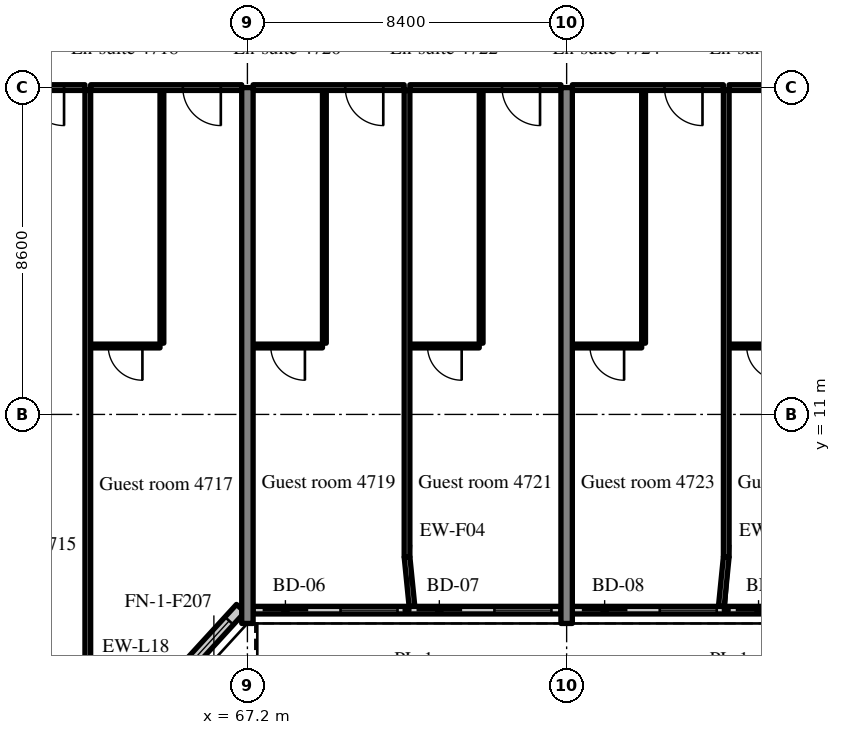
"""IFC4 building model, lengths in metres.
Left out: names, types, materials, properties, quantities, classifications, styles, units other than length and angle.
Written with IfcOpenShell. Run it as: python <this file> out.ifc"""

import sys

from ifc_helpers import new_model, si_unit, direction, frame, frame_2d, origin, place, context, subcontext, project, spatial, rectangle, extrude, source, transform, mapped, element, fill, save


model = new_model("IFC4")
c1 = context("Model", 3, precision=1e-05, world=origin(), true_north=direction((0.0, 1.0)))
c2 = subcontext(c1, "Body", "Model", "MODEL_VIEW")
j1 = project(units=[si_unit("LENGTHUNIT", "METRE"), si_unit("PLANEANGLEUNIT", "RADIAN")], contexts=[c1])
p1 = place(None, origin())
s1 = spatial("IfcSite", under=j1, at=p1, CompositionType="ELEMENT")
p2 = place(p1, origin())
s2 = spatial("IfcBuilding", under=s1, at=p2, CompositionType="ELEMENT")
p3 = place(p2, frame((0.0, 0.0, 193.4)))
s3 = spatial("IfcBuildingStorey", under=s2, at=p3, CompositionType="ELEMENT", Elevation=193.4)
m1 = source(origin(), c2, "Body", "SweptSolid", [
    extrude(rectangle(XDim=14.1, YDim=0.3, at=frame_2d((7.05, 0.0))), origin(), (0.0, 0.0, 1.0), 3.52),
])
for number, where, z_axis, x_axis in (
    (1, (67.2, 5.5, 0.0), (0.0, 0.0, 1.0), (0.0, 1.0, 0.0)),
    (2, (75.6, 5.5, 0.0), (0.0, 0.0, 1.0), (0.0, 1.0, 0.0)),
):
    element("IfcWall", number, at=place(p3, frame(where, z_axis=z_axis, x_axis=x_axis)), inside=s3, PredefinedType="SHEAR", context=c2, shape_type="MappedRepresentation", body=[
        mapped(m1, transform((0.0, 0.0, 0.0), scale=1.0)),
    ])
m2 = source(origin(), c2, "Body", "SweptSolid", [
    extrude(rectangle(XDim=2.398, YDim=0.3, at=frame_2d((1.199, 0.0))), origin(), (0.0, 0.0, 1.0), 3.52),
])
p4 = place(p3, frame((65.404, 4.131, 0.0), z_axis=(0.0, 0.0, 1.0), x_axis=(0.675374189419, 0.737475222815, 0.0)))
e3 = element("IfcWall", 3, at=p4, inside=s3, PredefinedType="SOLIDWALL", context=c2, shape_type="MappedRepresentation", body=[
    mapped(m2, transform((0.0, 0.0, 0.0), scale=1.0)),
])
m3 = source(origin(), c2, "Body", "SweptSolid", [
    extrude(rectangle(XDim=1.5, YDim=2.0, at=frame_2d((0.75, 1.0))), frame((0.0, 0.16, 0.0), z_axis=(0.0, -1.0, 0.0), x_axis=(1.0, 0.0, 0.0)), (0.0, 0.0, 1.0), 0.32),
])
p5 = place(p4, frame((0.449, 0.0, 0.9)))
e4 = element("IfcOpeningElement", 4, at=p5, cuts=e3, PredefinedType="OPENING", context=c2, shape_type="MappedRepresentation", body=[
    mapped(m3, transform((0.0, 0.0, 0.0), scale=1.0)),
])
m4 = source(origin(), c2, "Body", "SweptSolid", [
    extrude(rectangle(XDim=8.1, YDim=0.2, at=frame_2d((4.05, 0.0))), origin(), (0.0, 0.0, 1.0), 2.87),
])
p6 = place(p3, frame((67.35, 5.85, 0.0), z_axis=(0.0, 0.0, 1.0), x_axis=(1.0, 0.0, 0.0)))
e5 = element("IfcWall", 5, at=p6, inside=s3, PredefinedType="SOLIDWALL", context=c2, shape_type="MappedRepresentation", body=[
    mapped(m4, transform((0.0, 0.0, 0.0), scale=1.0)),
])
m5 = source(origin(), c2, "Body", "SweptSolid", [
    extrude(rectangle(XDim=1.2, YDim=2.4, at=frame_2d((0.6, 1.2))), frame((0.0, 0.11, 0.0), z_axis=(0.0, -1.0, 0.0), x_axis=(1.0, 0.0, 0.0)), (0.0, 0.0, 1.0), 0.22),
])
p7 = place(p6, frame((0.25, 0.0, 0.0)))
e6 = element("IfcOpeningElement", 6, at=p7, cuts=e5, PredefinedType="OPENING", context=c2, shape_type="MappedRepresentation", body=[
    mapped(m5, transform((0.0, 0.0, 0.0), scale=1.0)),
])
m6 = source(origin(), c2, "Body", "SweptSolid", [
    extrude(rectangle(XDim=1.5, YDim=1.5, at=frame_2d((0.75, 0.75))), frame((0.0, 0.11, 0.0), z_axis=(0.0, -1.0, 0.0), x_axis=(1.0, 0.0, 0.0)), (0.0, 0.0, 1.0), 0.22),
])
p8 = place(p6, frame((2.3, 0.0, 0.9)))
e7 = element("IfcOpeningElement", 7, at=p8, cuts=e5, PredefinedType="OPENING", context=c2, shape_type="MappedRepresentation", body=[
    mapped(m6, transform((0.0, 0.0, 0.0), scale=1.0)),
])
p9 = place(p6, frame((4.3, 0.0, 0.0)))
e8 = element("IfcOpeningElement", 8, at=p9, cuts=e5, PredefinedType="OPENING", context=c2, shape_type="MappedRepresentation", body=[
    mapped(m5, transform((0.0, 0.0, 0.0), scale=1.0)),
])
p10 = place(p6, frame((6.35, 0.0, 0.9)))
e9 = element("IfcOpeningElement", 9, at=p10, cuts=e5, PredefinedType="OPENING", context=c2, shape_type="MappedRepresentation", body=[
    mapped(m6, transform((0.0, 0.0, 0.0), scale=1.0)),
])
m7 = source(origin(), c2, "Body", "SweptSolid", [
    extrude(rectangle(XDim=8.1, YDim=0.2, at=frame_2d((4.05, 0.0))), origin(), (0.0, 0.0, 1.0), 2.87),
])
p11 = place(p3, frame((75.75, 5.85, 0.0), z_axis=(0.0, 0.0, 1.0), x_axis=(1.0, 0.0, 0.0)))
e10 = element("IfcWall", 10, at=p11, inside=s3, PredefinedType="SOLIDWALL", context=c2, shape_type="MappedRepresentation", body=[
    mapped(m7, transform((0.0, 0.0, 0.0), scale=1.0)),
])
p12 = place(p11, frame((0.25, 0.0, 0.0)))
e11 = element("IfcOpeningElement", 11, at=p12, cuts=e10, PredefinedType="OPENING", context=c2, shape_type="MappedRepresentation", body=[
    mapped(m5, transform((0.0, 0.0, 0.0), scale=1.0)),
])
p13 = place(p11, frame((2.3, 0.0, 0.9)))
e12 = element("IfcOpeningElement", 12, at=p13, cuts=e10, PredefinedType="OPENING", context=c2, shape_type="MappedRepresentation", body=[
    mapped(m6, transform((0.0, 0.0, 0.0), scale=1.0)),
])
p14 = place(p11, frame((4.3, 0.0, 0.0)))
e13 = element("IfcOpeningElement", 13, at=p14, cuts=e10, PredefinedType="OPENING", context=c2, shape_type="MappedRepresentation", body=[
    mapped(m5, transform((0.0, 0.0, 0.0), scale=1.0)),
])
p15 = place(p11, frame((6.35, 0.0, 0.9)))
e14 = element("IfcOpeningElement", 14, at=p15, cuts=e10, PredefinedType="OPENING", context=c2, shape_type="MappedRepresentation", body=[
    mapped(m6, transform((0.0, 0.0, 0.0), scale=1.0)),
])
m8 = source(origin(), c2, "Body", "SweptSolid", [
    extrude(rectangle(XDim=3.975, YDim=0.15, at=frame_2d((1.988, 0.0))), origin(), (0.0, 0.0, 1.0), 2.82),
])
p16 = place(p3, frame((58.95, 19.6, 0.0), z_axis=(0.0, 0.0, 1.0), x_axis=(1.0, 0.0, 0.0)))
e15 = element("IfcWall", 15, at=p16, inside=s3, PredefinedType="PARTITIONING", context=c2, shape_type="MappedRepresentation", body=[
    mapped(m8, transform((0.0, 0.0, 0.0), scale=1.0)),
])
m9 = source(origin(), c2, "Body", "SweptSolid", [
    extrude(rectangle(XDim=1.0, YDim=2.1, at=frame_2d((0.5, 1.05))), frame((0.0, 0.085, 0.0), z_axis=(0.0, -1.0, 0.0), x_axis=(1.0, 0.0, 0.0)), (0.0, 0.0, 1.0), 0.17),
])
p17 = place(p16, frame((2.425, 0.0, 0.0)))
e16 = element("IfcOpeningElement", 16, at=p17, cuts=e15, PredefinedType="OPENING", context=c2, shape_type="MappedRepresentation", body=[
    mapped(m9, transform((0.0, 0.0, 0.0), scale=1.0)),
])
m10 = source(origin(), c2, "Body", "SweptSolid", [
    extrude(rectangle(XDim=6.65, YDim=0.1, at=frame_2d((3.325, 0.0))), origin(), (0.0, 0.0, 1.0), 3.52),
])
p18 = place(p3, frame((64.95, 12.875, 0.0), z_axis=(0.0, 0.0, 1.0), x_axis=(0.0, 1.0, 0.0)))
e17 = element("IfcWall", 17, at=p18, inside=s3, PredefinedType="PARTITIONING", context=c2, shape_type="MappedRepresentation", body=[
    mapped(m10, transform((0.0, 0.0, 0.0), scale=1.0)),
])
m11 = source(origin(), c2, "Body", "SweptSolid", [
    extrude(rectangle(XDim=1.825, YDim=0.1, at=frame_2d((0.913, 0.0))), origin(), (0.0, 0.0, 1.0), 3.52),
])
p19 = place(p3, frame((63.075, 12.8, 0.0), z_axis=(0.0, 0.0, 1.0), x_axis=(1.0, 0.0, 0.0)))
e18 = element("IfcWall", 18, at=p19, inside=s3, PredefinedType="PARTITIONING", context=c2, shape_type="MappedRepresentation", body=[
    mapped(m11, transform((0.0, 0.0, 0.0), scale=1.0)),
])
m12 = source(origin(), c2, "Body", "SweptSolid", [
    extrude(rectangle(XDim=0.9, YDim=2.1, at=frame_2d((0.45, 1.05))), frame((0.0, 0.06, 0.0), z_axis=(0.0, -1.0, 0.0), x_axis=(1.0, 0.0, 0.0)), (0.0, 0.0, 1.0), 0.12),
])
p20 = place(p19, frame((0.462, 0.0, 0.0)))
e19 = element("IfcOpeningElement", 19, at=p20, cuts=e18, PredefinedType="OPENING", context=c2, shape_type="MappedRepresentation", body=[
    mapped(m12, transform((0.0, 0.0, 0.0), scale=1.0)),
])
p21 = place(p3, frame((63.075, 19.6, 0.0), z_axis=(0.0, 0.0, 1.0), x_axis=(1.0, 0.0, 0.0)))
e20 = element("IfcWall", 20, at=p21, inside=s3, PredefinedType="PARTITIONING", context=c2, shape_type="MappedRepresentation", body=[
    mapped(m8, transform((0.0, 0.0, 0.0), scale=1.0)),
])
p22 = place(p21, frame((2.425, 0.0, 0.0)))
e21 = element("IfcOpeningElement", 21, at=p22, cuts=e20, PredefinedType="OPENING", context=c2, shape_type="MappedRepresentation", body=[
    mapped(m9, transform((0.0, 0.0, 0.0), scale=1.0)),
])
m13 = source(origin(), c2, "Body", "SweptSolid", [
    extrude(rectangle(XDim=15.498, YDim=0.15, at=frame_2d((7.749, 0.0))), origin(), (0.0, 0.0, 1.0), 3.52),
])
p23 = place(p3, frame((63.0, 4.027, 0.0), z_axis=(0.0, 0.0, 1.0), x_axis=(0.0, 1.0, 0.0)))
e22 = element("IfcWall", 22, at=p23, inside=s3, PredefinedType="PARTITIONING", context=c2, shape_type="MappedRepresentation", body=[
    mapped(m13, transform((0.0, 0.0, 0.0), scale=1.0)),
])
p24 = place(p3, frame((69.225, 12.875, 0.0), z_axis=(0.0, 0.0, 1.0), x_axis=(0.0, 1.0, 0.0)))
e23 = element("IfcWall", 23, at=p24, inside=s3, PredefinedType="PARTITIONING", context=c2, shape_type="MappedRepresentation", body=[
    mapped(m10, transform((0.0, 0.0, 0.0), scale=1.0)),
])
p25 = place(p3, frame((67.35, 12.8, 0.0), z_axis=(0.0, 0.0, 1.0), x_axis=(1.0, 0.0, 0.0)))
e24 = element("IfcWall", 24, at=p25, inside=s3, PredefinedType="PARTITIONING", context=c2, shape_type="MappedRepresentation", body=[
    mapped(m11, transform((0.0, 0.0, 0.0), scale=1.0)),
])
p26 = place(p25, frame((0.463, 0.0, 0.0)))
e25 = element("IfcOpeningElement", 25, at=p26, cuts=e24, PredefinedType="OPENING", context=c2, shape_type="MappedRepresentation", body=[
    mapped(m12, transform((0.0, 0.0, 0.0), scale=1.0)),
])
m14 = source(origin(), c2, "Body", "SweptSolid", [
    extrude(rectangle(XDim=3.975, YDim=0.15, at=frame_2d((1.987, 0.0))), origin(), (0.0, 0.0, 1.0), 2.82),
])
p27 = place(p3, frame((67.35, 19.6, 0.0), z_axis=(0.0, 0.0, 1.0), x_axis=(1.0, 0.0, 0.0)))
e26 = element("IfcWall", 26, at=p27, inside=s3, PredefinedType="PARTITIONING", context=c2, shape_type="MappedRepresentation", body=[
    mapped(m14, transform((0.0, 0.0, 0.0), scale=1.0)),
])
p28 = place(p27, frame((2.425, 0.0, 0.0)))
e27 = element("IfcOpeningElement", 27, at=p28, cuts=e26, PredefinedType="OPENING", context=c2, shape_type="MappedRepresentation", body=[
    mapped(m9, transform((0.0, 0.0, 0.0), scale=1.0)),
])
p29 = place(p3, frame((73.35, 12.875, 0.0), z_axis=(0.0, 0.0, 1.0), x_axis=(0.0, 1.0, 0.0)))
e28 = element("IfcWall", 28, at=p29, inside=s3, PredefinedType="PARTITIONING", context=c2, shape_type="MappedRepresentation", body=[
    mapped(m10, transform((0.0, 0.0, 0.0), scale=1.0)),
])
p30 = place(p3, frame((71.475, 12.8, 0.0), z_axis=(0.0, 0.0, 1.0), x_axis=(1.0, 0.0, 0.0)))
e29 = element("IfcWall", 29, at=p30, inside=s3, PredefinedType="PARTITIONING", context=c2, shape_type="MappedRepresentation", body=[
    mapped(m11, transform((0.0, 0.0, 0.0), scale=1.0)),
])
p31 = place(p30, frame((0.463, 0.0, 0.0)))
e30 = element("IfcOpeningElement", 30, at=p31, cuts=e29, PredefinedType="OPENING", context=c2, shape_type="MappedRepresentation", body=[
    mapped(m12, transform((0.0, 0.0, 0.0), scale=1.0)),
])
p32 = place(p3, frame((71.475, 19.6, 0.0), z_axis=(0.0, 0.0, 1.0), x_axis=(1.0, 0.0, 0.0)))
e31 = element("IfcWall", 31, at=p32, inside=s3, PredefinedType="PARTITIONING", context=c2, shape_type="MappedRepresentation", body=[
    mapped(m14, transform((0.0, 0.0, 0.0), scale=1.0)),
])
p33 = place(p32, frame((2.425, 0.0, 0.0)))
e32 = element("IfcOpeningElement", 32, at=p33, cuts=e31, PredefinedType="OPENING", context=c2, shape_type="MappedRepresentation", body=[
    mapped(m9, transform((0.0, 0.0, 0.0), scale=1.0)),
])
m15 = source(origin(), c2, "Body", "SweptSolid", [
    extrude(rectangle(XDim=12.275, YDim=0.15, at=frame_2d((6.137, 0.0))), origin(), (0.0, 0.0, 1.0), 3.52),
])
p34 = place(p3, frame((71.4, 7.25, 0.0), z_axis=(0.0, 0.0, 1.0), x_axis=(0.0, 1.0, 0.0)))
e33 = element("IfcWall", 33, at=p34, inside=s3, PredefinedType="PARTITIONING", context=c2, shape_type="MappedRepresentation", body=[
    mapped(m15, transform((0.0, 0.0, 0.0), scale=1.0)),
])
p35 = place(p3, frame((77.625, 12.875, 0.0), z_axis=(0.0, 0.0, 1.0), x_axis=(0.0, 1.0, 0.0)))
e34 = element("IfcWall", 34, at=p35, inside=s3, PredefinedType="PARTITIONING", context=c2, shape_type="MappedRepresentation", body=[
    mapped(m10, transform((0.0, 0.0, 0.0), scale=1.0)),
])
p36 = place(p3, frame((75.75, 12.8, 0.0), z_axis=(0.0, 0.0, 1.0), x_axis=(1.0, 0.0, 0.0)))
e35 = element("IfcWall", 35, at=p36, inside=s3, PredefinedType="PARTITIONING", context=c2, shape_type="MappedRepresentation", body=[
    mapped(m11, transform((0.0, 0.0, 0.0), scale=1.0)),
])
p37 = place(p36, frame((0.462, 0.0, 0.0)))
e36 = element("IfcOpeningElement", 36, at=p37, cuts=e35, PredefinedType="OPENING", context=c2, shape_type="MappedRepresentation", body=[
    mapped(m12, transform((0.0, 0.0, 0.0), scale=1.0)),
])
p38 = place(p3, frame((75.75, 19.6, 0.0), z_axis=(0.0, 0.0, 1.0), x_axis=(1.0, 0.0, 0.0)))
e37 = element("IfcWall", 37, at=p38, inside=s3, PredefinedType="PARTITIONING", context=c2, shape_type="MappedRepresentation", body=[
    mapped(m8, transform((0.0, 0.0, 0.0), scale=1.0)),
])
p39 = place(p38, frame((2.425, 0.0, 0.0)))
e38 = element("IfcOpeningElement", 38, at=p39, cuts=e37, PredefinedType="OPENING", context=c2, shape_type="MappedRepresentation", body=[
    mapped(m9, transform((0.0, 0.0, 0.0), scale=1.0)),
])
p40 = place(p3, frame((79.875, 12.8, 0.0), z_axis=(0.0, 0.0, 1.0), x_axis=(1.0, 0.0, 0.0)))
e39 = element("IfcWall", 39, at=p40, inside=s3, PredefinedType="PARTITIONING", context=c2, shape_type="MappedRepresentation", body=[
    mapped(m11, transform((0.0, 0.0, 0.0), scale=1.0)),
])
p41 = place(p40, frame((0.462, 0.0, 0.0)))
e40 = element("IfcOpeningElement", 40, at=p41, cuts=e39, PredefinedType="OPENING", context=c2, shape_type="MappedRepresentation", body=[
    mapped(m12, transform((0.0, 0.0, 0.0), scale=1.0)),
])
p42 = place(p3, frame((79.875, 19.6, 0.0), z_axis=(0.0, 0.0, 1.0), x_axis=(1.0, 0.0, 0.0)))
e41 = element("IfcWall", 41, at=p42, inside=s3, PredefinedType="PARTITIONING", context=c2, shape_type="MappedRepresentation", body=[
    mapped(m8, transform((0.0, 0.0, 0.0), scale=1.0)),
])
p43 = place(p42, frame((2.425, 0.0, 0.0)))
e42 = element("IfcOpeningElement", 42, at=p43, cuts=e41, PredefinedType="OPENING", context=c2, shape_type="MappedRepresentation", body=[
    mapped(m9, transform((0.0, 0.0, 0.0), scale=1.0)),
])
p44 = place(p3, frame((79.8, 7.25, 0.0), z_axis=(0.0, 0.0, 1.0), x_axis=(0.0, 1.0, 0.0)))
e43 = element("IfcWall", 43, at=p44, inside=s3, PredefinedType="PARTITIONING", context=c2, shape_type="MappedRepresentation", body=[
    mapped(m15, transform((0.0, 0.0, 0.0), scale=1.0)),
])
m16 = source(origin(), c2, "Body", "SweptSolid", [
    extrude(rectangle(XDim=1.307, YDim=0.15, at=frame_2d((0.653, 0.0))), origin(), (0.0, 0.0, 1.0), 3.52),
])
for number, where, z_axis, x_axis in (
    (44, (71.53, 5.95, 0.0), (0.0, 0.0, 1.0), (-0.1, 0.995, 0.0)),
    (45, (79.67, 5.95, 0.0), (0.0, 0.0, 1.0), (0.1, 0.995, 0.0)),
):
    element("IfcWall", number, at=place(p3, frame(where, z_axis=z_axis, x_axis=x_axis)), inside=s3, PredefinedType="PARTITIONING", context=c2, shape_type="MappedRepresentation", body=[
        mapped(m16, transform((0.0, 0.0, 0.0), scale=1.0)),
    ])
m17 = source(origin(), c2, "Body", "SweptSolid", [
    extrude(rectangle(XDim=1.5, YDim=2.0, at=frame_2d((0.75, 1.0))), frame((0.0, 0.03, 0.0), z_axis=(0.0, -1.0, 0.0), x_axis=(1.0, 0.0, 0.0)), (0.0, 0.0, 1.0), 0.06),
])
p45 = place(p5, origin())
e46 = element("IfcWindow", 46, at=p45, inside=s3, PartitioningType="SINGLE_PANEL", PredefinedType="WINDOW", context=c2, shape_type="MappedRepresentation", body=[
    mapped(m17, transform((0.0, 0.0, 0.0), scale=1.0)),
])
fill(e4, e46)
m18 = source(origin(), c2, "Body", "SweptSolid", [
    extrude(rectangle(XDim=1.2, YDim=2.4, at=frame_2d((0.6, 1.2))), frame((0.0, 0.025, 0.0), z_axis=(0.0, -1.0, 0.0), x_axis=(1.0, 0.0, 0.0)), (0.0, 0.0, 1.0), 0.05),
])
p46 = place(p7, origin())
e47 = element("IfcDoor", 47, at=p46, inside=s3, OperationType="SLIDING_TO_RIGHT", PredefinedType="DOOR", context=c2, shape_type="MappedRepresentation", body=[
    mapped(m18, transform((0.0, 0.0, 0.0), scale=1.0)),
])
fill(e6, e47)
m19 = source(origin(), c2, "Body", "SweptSolid", [
    extrude(rectangle(XDim=1.5, YDim=1.5, at=frame_2d((0.75, 0.75))), frame((0.0, 0.03, 0.0), z_axis=(0.0, -1.0, 0.0), x_axis=(1.0, 0.0, 0.0)), (0.0, 0.0, 1.0), 0.06),
])
p47 = place(p8, origin())
e48 = element("IfcWindow", 48, at=p47, inside=s3, PartitioningType="SINGLE_PANEL", PredefinedType="WINDOW", context=c2, shape_type="MappedRepresentation", body=[
    mapped(m19, transform((0.0, 0.0, 0.0), scale=1.0)),
])
fill(e7, e48)
p48 = place(p9, origin())
e49 = element("IfcDoor", 49, at=p48, inside=s3, OperationType="SLIDING_TO_LEFT", PredefinedType="DOOR", context=c2, shape_type="MappedRepresentation", body=[
    mapped(m18, transform((0.0, 0.0, 0.0), scale=1.0)),
])
fill(e8, e49)
p49 = place(p10, origin())
e50 = element("IfcWindow", 50, at=p49, inside=s3, PartitioningType="SINGLE_PANEL", PredefinedType="WINDOW", context=c2, shape_type="MappedRepresentation", body=[
    mapped(m19, transform((0.0, 0.0, 0.0), scale=1.0)),
])
fill(e9, e50)
p50 = place(p12, origin())
e51 = element("IfcDoor", 51, at=p50, inside=s3, OperationType="SLIDING_TO_RIGHT", PredefinedType="DOOR", context=c2, shape_type="MappedRepresentation", body=[
    mapped(m18, transform((0.0, 0.0, 0.0), scale=1.0)),
])
fill(e11, e51)
p51 = place(p13, origin())
e52 = element("IfcWindow", 52, at=p51, inside=s3, PartitioningType="SINGLE_PANEL", PredefinedType="WINDOW", context=c2, shape_type="MappedRepresentation", body=[
    mapped(m19, transform((0.0, 0.0, 0.0), scale=1.0)),
])
fill(e12, e52)
p52 = place(p14, origin())
e53 = element("IfcDoor", 53, at=p52, inside=s3, OperationType="SLIDING_TO_LEFT", PredefinedType="DOOR", context=c2, shape_type="MappedRepresentation", body=[
    mapped(m18, transform((0.0, 0.0, 0.0), scale=1.0)),
])
fill(e13, e53)
m20 = source(origin(), c2, "Body", "SweptSolid", [
    extrude(rectangle(XDim=1.0, YDim=2.1, at=frame_2d((0.5, 1.05))), frame((0.0, 0.025, 0.0), z_axis=(0.0, -1.0, 0.0), x_axis=(1.0, 0.0, 0.0)), (0.0, 0.0, 1.0), 0.05),
])
p53 = place(p17, origin())
e54 = element("IfcDoor", 54, at=p53, inside=s3, OperationType="SINGLE_SWING_RIGHT", PredefinedType="DOOR", context=c2, shape_type="MappedRepresentation", body=[
    mapped(m20, transform((0.0, 0.0, 0.0), scale=1.0)),
])
fill(e16, e54)
m21 = source(origin(), c2, "Body", "SweptSolid", [
    extrude(rectangle(XDim=0.9, YDim=2.1, at=frame_2d((0.45, 1.05))), frame((0.0, 0.025, 0.0), z_axis=(0.0, -1.0, 0.0), x_axis=(1.0, 0.0, 0.0)), (0.0, 0.0, 1.0), 0.05),
])
p54 = place(p20, origin())
e55 = element("IfcDoor", 55, at=p54, inside=s3, OperationType="SINGLE_SWING_RIGHT", PredefinedType="DOOR", context=c2, shape_type="MappedRepresentation", body=[
    mapped(m21, transform((0.0, 0.0, 0.0), scale=1.0)),
])
fill(e19, e55)
p55 = place(p22, origin())
e56 = element("IfcDoor", 56, at=p55, inside=s3, OperationType="SINGLE_SWING_RIGHT", PredefinedType="DOOR", context=c2, shape_type="MappedRepresentation", body=[
    mapped(m20, transform((0.0, 0.0, 0.0), scale=1.0)),
])
fill(e21, e56)
p56 = place(p26, origin())
e57 = element("IfcDoor", 57, at=p56, inside=s3, OperationType="SINGLE_SWING_RIGHT", PredefinedType="DOOR", context=c2, shape_type="MappedRepresentation", body=[
    mapped(m21, transform((0.0, 0.0, 0.0), scale=1.0)),
])
fill(e25, e57)
p57 = place(p28, origin())
e58 = element("IfcDoor", 58, at=p57, inside=s3, OperationType="SINGLE_SWING_RIGHT", PredefinedType="DOOR", context=c2, shape_type="MappedRepresentation", body=[
    mapped(m20, transform((0.0, 0.0, 0.0), scale=1.0)),
])
fill(e27, e58)
p58 = place(p31, origin())
e59 = element("IfcDoor", 59, at=p58, inside=s3, OperationType="SINGLE_SWING_RIGHT", PredefinedType="DOOR", context=c2, shape_type="MappedRepresentation", body=[
    mapped(m21, transform((0.0, 0.0, 0.0), scale=1.0)),
])
fill(e30, e59)
p59 = place(p33, origin())
e60 = element("IfcDoor", 60, at=p59, inside=s3, OperationType="SINGLE_SWING_RIGHT", PredefinedType="DOOR", context=c2, shape_type="MappedRepresentation", body=[
    mapped(m20, transform((0.0, 0.0, 0.0), scale=1.0)),
])
fill(e32, e60)
p60 = place(p37, origin())
e61 = element("IfcDoor", 61, at=p60, inside=s3, OperationType="SINGLE_SWING_RIGHT", PredefinedType="DOOR", context=c2, shape_type="MappedRepresentation", body=[
    mapped(m21, transform((0.0, 0.0, 0.0), scale=1.0)),
])
fill(e36, e61)
p61 = place(p39, origin())
e62 = element("IfcDoor", 62, at=p61, inside=s3, OperationType="SINGLE_SWING_RIGHT", PredefinedType="DOOR", context=c2, shape_type="MappedRepresentation", body=[
    mapped(m20, transform((0.0, 0.0, 0.0), scale=1.0)),
])
fill(e38, e62)
p62 = place(p41, origin())
e63 = element("IfcDoor", 63, at=p62, inside=s3, OperationType="SINGLE_SWING_RIGHT", PredefinedType="DOOR", context=c2, shape_type="MappedRepresentation", body=[
    mapped(m21, transform((0.0, 0.0, 0.0), scale=1.0)),
])
fill(e40, e63)
save(model, sys.argv[1])
